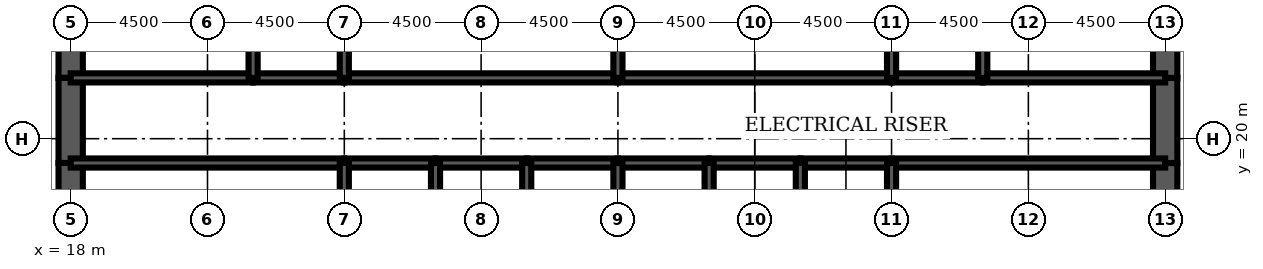
"""IFC4 building model, lengths in metres.
Left out: names, types, materials, properties, quantities, classifications, styles, units other than length and angle.
Written with IfcOpenShell. Run it as: python <this file> out.ifc"""

import sys

from ifc_helpers import new_model, si_unit, direction, frame, frame_2d, origin, place, context, subcontext, project, spatial, rectangle, extrude, element, fill, save


model = new_model("IFC4")
c1 = context("Model", 3, precision=1e-05, world=origin(), true_north=direction((0.0, 1.0)))
c2 = subcontext(c1, "Body", "Model", "MODEL_VIEW")
j1 = project(units=[si_unit("LENGTHUNIT", "METRE"), si_unit("PLANEANGLEUNIT", "RADIAN")], contexts=[c1])
p1 = place(None, origin())
s1 = spatial("IfcSite", under=j1, at=p1, CompositionType="ELEMENT")
p2 = place(p1, origin())
s2 = spatial("IfcBuilding", under=s1, at=p2, CompositionType="ELEMENT")
p3 = place(p2, frame((0.0, 0.0, 190.0)))
s3 = spatial("IfcBuildingStorey", under=s2, at=p3, CompositionType="ELEMENT", Elevation=190.0)
p4 = place(p3, frame((18.0, 26.0, 0.0), z_axis=(0.0, 0.0, 1.0), x_axis=(0.0, -1.0, 0.0)))
e1 = element("IfcWall", 1, at=p4, inside=s3, PredefinedType="SHEAR", context=c2, shape_type="SweptSolid", body=[
    extrude(rectangle(XDim=4.0, YDim=0.8, at=frame_2d((2.0, 0.0))), origin(), (0.0, 0.0, 1.0), 4.2),
])
p5 = place(p3, frame((18.0, 22.0, 0.0), z_axis=(0.0, 0.0, 1.0), x_axis=(0.0, -1.0, 0.0)))
e2 = element("IfcWall", 2, at=p5, inside=s3, PredefinedType="SHEAR", context=c2, shape_type="SweptSolid", body=[
    extrude(rectangle(XDim=2.8, YDim=0.8, at=frame_2d((1.4, 0.0))), origin(), (0.0, 0.0, 1.0), 4.2),
])
p6 = place(p5, frame((0.6, 0.0, 0.0)))
e3 = element("IfcOpeningElement", 3, at=p6, cuts=e2, PredefinedType="OPENING", context=c2, shape_type="SweptSolid", body=[
    extrude(rectangle(XDim=1.8, YDim=2.1, at=frame_2d((0.9, 1.05))), frame((0.0, 0.41, 0.0), z_axis=(0.0, -1.0, 0.0), x_axis=(1.0, 0.0, 0.0)), (0.0, 0.0, 1.0), 0.82),
])
for number, where, z_axis, x_axis in (
    (4, (18.0, 19.2, 0.0), (0.0, 0.0, 1.0), (0.0, -1.0, 0.0)),
    (5, (54.0, 16.0, 0.0), (0.0, 0.0, 1.0), (0.0, 1.0, 0.0)),
):
    element("IfcWall", number, at=place(p3, frame(where, z_axis=z_axis, x_axis=x_axis)), inside=s3, PredefinedType="SHEAR", context=c2, shape_type="SweptSolid", body=[
        extrude(rectangle(XDim=3.2, YDim=0.8, at=frame_2d((1.6, 0.0))), origin(), (0.0, 0.0, 1.0), 4.2),
    ])
p7 = place(p3, frame((54.0, 19.2, 0.0), z_axis=(0.0, 0.0, 1.0), x_axis=(0.0, 1.0, 0.0)))
e6 = element("IfcWall", 6, at=p7, inside=s3, PredefinedType="SHEAR", context=c2, shape_type="SweptSolid", body=[
    extrude(rectangle(XDim=2.8, YDim=0.8, at=frame_2d((1.4, 0.0))), origin(), (0.0, 0.0, 1.0), 4.2),
])
p8 = place(p7, frame((0.4, 0.0, 0.0)))
e7 = element("IfcOpeningElement", 7, at=p8, cuts=e6, PredefinedType="OPENING", context=c2, shape_type="SweptSolid", body=[
    extrude(rectangle(XDim=1.8, YDim=2.1, at=frame_2d((0.9, 1.05))), frame((0.0, 0.41, 0.0), z_axis=(0.0, -1.0, 0.0), x_axis=(1.0, 0.0, 0.0)), (0.0, 0.0, 1.0), 0.82),
])
p9 = place(p3, frame((54.0, 22.0, 0.0), z_axis=(0.0, 0.0, 1.0), x_axis=(0.0, 1.0, 0.0)))
e8 = element("IfcWall", 8, at=p9, inside=s3, PredefinedType="SHEAR", context=c2, shape_type="SweptSolid", body=[
    extrude(rectangle(XDim=4.0, YDim=0.8, at=frame_2d((2.0, 0.0))), origin(), (0.0, 0.0, 1.0), 4.2),
])
p10 = place(p3, frame((18.0, 19.2, 0.0), z_axis=(0.0, 0.0, 1.0), x_axis=(1.0, 0.0, 0.0)))
e9 = element("IfcWall", 9, at=p10, inside=s3, PredefinedType="SOLIDWALL", context=c2, shape_type="SweptSolid", body=[
    extrude(rectangle(XDim=9.0, YDim=0.3, at=frame_2d((4.5, 0.0))), origin(), (0.0, 0.0, 1.0), 4.2),
])
p11 = place(p10, frame((0.65, 0.0, 0.0)))
e10 = element("IfcOpeningElement", 10, at=p11, cuts=e9, PredefinedType="OPENING", context=c2, shape_type="SweptSolid", body=[
    extrude(rectangle(XDim=1.0, YDim=2.1, at=frame_2d((0.5, 1.05))), frame((0.0, 0.16, 0.0), z_axis=(0.0, -1.0, 0.0), x_axis=(1.0, 0.0, 0.0)), (0.0, 0.0, 1.0), 0.32),
])
p12 = place(p3, frame((27.0, 19.2, 0.0), z_axis=(0.0, 0.0, 1.0), x_axis=(1.0, 0.0, 0.0)))
e11 = element("IfcWall", 11, at=p12, inside=s3, PredefinedType="SOLIDWALL", context=c2, shape_type="SweptSolid", body=[
    extrude(rectangle(XDim=3.0, YDim=0.3, at=frame_2d((1.5, 0.0))), origin(), (0.0, 0.0, 1.0), 4.2),
])
p13 = place(p12, frame((0.95, 0.0, 0.0)))
e12 = element("IfcOpeningElement", 12, at=p13, cuts=e11, PredefinedType="OPENING", context=c2, shape_type="SweptSolid", body=[
    extrude(rectangle(XDim=1.1, YDim=2.2, at=frame_2d((0.55, 1.1))), frame((0.0, 0.16, 0.0), z_axis=(0.0, -1.0, 0.0), x_axis=(1.0, 0.0, 0.0)), (0.0, 0.0, 1.0), 0.32),
])
p14 = place(p3, frame((30.0, 19.2, 0.0), z_axis=(0.0, 0.0, 1.0), x_axis=(1.0, 0.0, 0.0)))
e13 = element("IfcWall", 13, at=p14, inside=s3, PredefinedType="SOLIDWALL", context=c2, shape_type="SweptSolid", body=[
    extrude(rectangle(XDim=3.0, YDim=0.3, at=frame_2d((1.5, 0.0))), origin(), (0.0, 0.0, 1.0), 4.2),
])
p15 = place(p14, frame((0.95, 0.0, 0.0)))
e14 = element("IfcOpeningElement", 14, at=p15, cuts=e13, PredefinedType="OPENING", context=c2, shape_type="SweptSolid", body=[
    extrude(rectangle(XDim=1.1, YDim=2.2, at=frame_2d((0.55, 1.1))), frame((0.0, 0.16, 0.0), z_axis=(0.0, -1.0, 0.0), x_axis=(1.0, 0.0, 0.0)), (0.0, 0.0, 1.0), 0.32),
])
p16 = place(p3, frame((33.0, 19.2, 0.0), z_axis=(0.0, 0.0, 1.0), x_axis=(1.0, 0.0, 0.0)))
e15 = element("IfcWall", 15, at=p16, inside=s3, PredefinedType="SOLIDWALL", context=c2, shape_type="SweptSolid", body=[
    extrude(rectangle(XDim=3.0, YDim=0.3, at=frame_2d((1.5, 0.0))), origin(), (0.0, 0.0, 1.0), 4.2),
])
p17 = place(p16, frame((0.95, 0.0, 0.0)))
e16 = element("IfcOpeningElement", 16, at=p17, cuts=e15, PredefinedType="OPENING", context=c2, shape_type="SweptSolid", body=[
    extrude(rectangle(XDim=1.1, YDim=2.2, at=frame_2d((0.55, 1.1))), frame((0.0, 0.16, 0.0), z_axis=(0.0, -1.0, 0.0), x_axis=(1.0, 0.0, 0.0)), (0.0, 0.0, 1.0), 0.32),
])
p18 = place(p3, frame((36.0, 19.2, 0.0), z_axis=(0.0, 0.0, 1.0), x_axis=(1.0, 0.0, 0.0)))
e17 = element("IfcWall", 17, at=p18, inside=s3, PredefinedType="SOLIDWALL", context=c2, shape_type="SweptSolid", body=[
    extrude(rectangle(XDim=3.0, YDim=0.3, at=frame_2d((1.5, 0.0))), origin(), (0.0, 0.0, 1.0), 4.2),
])
p19 = place(p18, frame((0.95, 0.0, 0.0)))
e18 = element("IfcOpeningElement", 18, at=p19, cuts=e17, PredefinedType="OPENING", context=c2, shape_type="SweptSolid", body=[
    extrude(rectangle(XDim=1.1, YDim=2.2, at=frame_2d((0.55, 1.1))), frame((0.0, 0.16, 0.0), z_axis=(0.0, -1.0, 0.0), x_axis=(1.0, 0.0, 0.0)), (0.0, 0.0, 1.0), 0.32),
])
p20 = place(p3, frame((39.0, 19.2, 0.0), z_axis=(0.0, 0.0, 1.0), x_axis=(1.0, 0.0, 0.0)))
e19 = element("IfcWall", 19, at=p20, inside=s3, PredefinedType="SOLIDWALL", context=c2, shape_type="SweptSolid", body=[
    extrude(rectangle(XDim=3.0, YDim=0.3, at=frame_2d((1.5, 0.0))), origin(), (0.0, 0.0, 1.0), 4.2),
])
p21 = place(p20, frame((1.0, 0.0, 0.0)))
e20 = element("IfcOpeningElement", 20, at=p21, cuts=e19, PredefinedType="OPENING", context=c2, shape_type="SweptSolid", body=[
    extrude(rectangle(XDim=1.0, YDim=2.1, at=frame_2d((0.5, 1.05))), frame((0.0, 0.16, 0.0), z_axis=(0.0, -1.0, 0.0), x_axis=(1.0, 0.0, 0.0)), (0.0, 0.0, 1.0), 0.32),
])
p22 = place(p3, frame((42.0, 19.2, 0.0), z_axis=(0.0, 0.0, 1.0), x_axis=(1.0, 0.0, 0.0)))
e21 = element("IfcWall", 21, at=p22, inside=s3, PredefinedType="SOLIDWALL", context=c2, shape_type="SweptSolid", body=[
    extrude(rectangle(XDim=3.0, YDim=0.3, at=frame_2d((1.5, 0.0))), origin(), (0.0, 0.0, 1.0), 4.2),
])
p23 = place(p22, frame((1.0, 0.0, 0.0)))
e22 = element("IfcOpeningElement", 22, at=p23, cuts=e21, PredefinedType="OPENING", context=c2, shape_type="SweptSolid", body=[
    extrude(rectangle(XDim=1.0, YDim=2.1, at=frame_2d((0.5, 1.05))), frame((0.0, 0.16, 0.0), z_axis=(0.0, -1.0, 0.0), x_axis=(1.0, 0.0, 0.0)), (0.0, 0.0, 1.0), 0.32),
])
p24 = place(p3, frame((45.0, 19.2, 0.0), z_axis=(0.0, 0.0, 1.0), x_axis=(1.0, 0.0, 0.0)))
e23 = element("IfcWall", 23, at=p24, inside=s3, PredefinedType="SOLIDWALL", context=c2, shape_type="SweptSolid", body=[
    extrude(rectangle(XDim=9.0, YDim=0.3, at=frame_2d((4.5, 0.0))), origin(), (0.0, 0.0, 1.0), 4.2),
])
p25 = place(p24, frame((7.35, 0.0, 0.0)))
e24 = element("IfcOpeningElement", 24, at=p25, cuts=e23, PredefinedType="OPENING", context=c2, shape_type="SweptSolid", body=[
    extrude(rectangle(XDim=1.0, YDim=2.1, at=frame_2d((0.5, 1.05))), frame((0.0, 0.16, 0.0), z_axis=(0.0, -1.0, 0.0), x_axis=(1.0, 0.0, 0.0)), (0.0, 0.0, 1.0), 0.32),
])
p26 = place(p3, frame((18.0, 22.0, 0.0), z_axis=(0.0, 0.0, 1.0), x_axis=(1.0, 0.0, 0.0)))
e25 = element("IfcWall", 25, at=p26, inside=s3, PredefinedType="SOLIDWALL", context=c2, shape_type="SweptSolid", body=[
    extrude(rectangle(XDim=6.0, YDim=0.3, at=frame_2d((3.0, 0.0))), origin(), (0.0, 0.0, 1.0), 4.2),
])
p27 = place(p26, frame((4.4, 0.0, 0.0)))
e26 = element("IfcOpeningElement", 26, at=p27, cuts=e25, PredefinedType="OPENING", context=c2, shape_type="SweptSolid", body=[
    extrude(rectangle(XDim=1.0, YDim=2.1, at=frame_2d((0.5, 1.05))), frame((0.0, 0.16, 0.0), z_axis=(0.0, -1.0, 0.0), x_axis=(1.0, 0.0, 0.0)), (0.0, 0.0, 1.0), 0.32),
])
p28 = place(p26, frame((0.8, 0.0, 0.0)))
e27 = element("IfcOpeningElement", 27, at=p28, cuts=e25, PredefinedType="OPENING", context=c2, shape_type="SweptSolid", body=[
    extrude(rectangle(XDim=1.0, YDim=2.1, at=frame_2d((0.5, 1.05))), frame((0.0, 0.16, 0.0), z_axis=(0.0, -1.0, 0.0), x_axis=(1.0, 0.0, 0.0)), (0.0, 0.0, 1.0), 0.32),
])
p29 = place(p3, frame((24.0, 22.0, 0.0), z_axis=(0.0, 0.0, 1.0), x_axis=(1.0, 0.0, 0.0)))
e28 = element("IfcWall", 28, at=p29, inside=s3, PredefinedType="SOLIDWALL", context=c2, shape_type="SweptSolid", body=[
    extrude(rectangle(XDim=3.0, YDim=0.3, at=frame_2d((1.5, 0.0))), origin(), (0.0, 0.0, 1.0), 4.2),
])
p30 = place(p29, frame((1.0, 0.0, 0.0)))
e29 = element("IfcOpeningElement", 29, at=p30, cuts=e28, PredefinedType="OPENING", context=c2, shape_type="SweptSolid", body=[
    extrude(rectangle(XDim=1.0, YDim=2.1, at=frame_2d((0.5, 1.05))), frame((0.0, 0.16, 0.0), z_axis=(0.0, -1.0, 0.0), x_axis=(1.0, 0.0, 0.0)), (0.0, 0.0, 1.0), 0.32),
])
p31 = place(p3, frame((27.0, 22.0, 0.0), z_axis=(0.0, 0.0, 1.0), x_axis=(1.0, 0.0, 0.0)))
e30 = element("IfcWall", 30, at=p31, inside=s3, PredefinedType="SOLIDWALL", context=c2, shape_type="SweptSolid", body=[
    extrude(rectangle(XDim=9.0, YDim=0.3, at=frame_2d((4.5, 0.0))), origin(), (0.0, 0.0, 1.0), 4.2),
])
p32 = place(p31, frame((4.0, 0.0, 0.0)))
e31 = element("IfcOpeningElement", 31, at=p32, cuts=e30, PredefinedType="OPENING", context=c2, shape_type="SweptSolid", body=[
    extrude(rectangle(XDim=1.0, YDim=2.1, at=frame_2d((0.5, 1.05))), frame((0.0, 0.16, 0.0), z_axis=(0.0, -1.0, 0.0), x_axis=(1.0, 0.0, 0.0)), (0.0, 0.0, 1.0), 0.32),
])
p33 = place(p3, frame((36.0, 22.0, 0.0), z_axis=(0.0, 0.0, 1.0), x_axis=(1.0, 0.0, 0.0)))
e32 = element("IfcWall", 32, at=p33, inside=s3, PredefinedType="SOLIDWALL", context=c2, shape_type="SweptSolid", body=[
    extrude(rectangle(XDim=9.0, YDim=0.3, at=frame_2d((4.5, 0.0))), origin(), (0.0, 0.0, 1.0), 4.2),
])
p34 = place(p33, frame((4.0, 0.0, 0.0)))
e33 = element("IfcOpeningElement", 33, at=p34, cuts=e32, PredefinedType="OPENING", context=c2, shape_type="SweptSolid", body=[
    extrude(rectangle(XDim=1.0, YDim=2.1, at=frame_2d((0.5, 1.05))), frame((0.0, 0.16, 0.0), z_axis=(0.0, -1.0, 0.0), x_axis=(1.0, 0.0, 0.0)), (0.0, 0.0, 1.0), 0.32),
])
p35 = place(p3, frame((45.0, 22.0, 0.0), z_axis=(0.0, 0.0, 1.0), x_axis=(1.0, 0.0, 0.0)))
e34 = element("IfcWall", 34, at=p35, inside=s3, PredefinedType="SOLIDWALL", context=c2, shape_type="SweptSolid", body=[
    extrude(rectangle(XDim=3.0, YDim=0.3, at=frame_2d((1.5, 0.0))), origin(), (0.0, 0.0, 1.0), 4.2),
])
p36 = place(p35, frame((1.0, 0.0, 0.0)))
e35 = element("IfcOpeningElement", 35, at=p36, cuts=e34, PredefinedType="OPENING", context=c2, shape_type="SweptSolid", body=[
    extrude(rectangle(XDim=1.0, YDim=2.1, at=frame_2d((0.5, 1.05))), frame((0.0, 0.16, 0.0), z_axis=(0.0, -1.0, 0.0), x_axis=(1.0, 0.0, 0.0)), (0.0, 0.0, 1.0), 0.32),
])
p37 = place(p3, frame((48.0, 22.0, 0.0), z_axis=(0.0, 0.0, 1.0), x_axis=(1.0, 0.0, 0.0)))
e36 = element("IfcWall", 36, at=p37, inside=s3, PredefinedType="SOLIDWALL", context=c2, shape_type="SweptSolid", body=[
    extrude(rectangle(XDim=6.0, YDim=0.3, at=frame_2d((3.0, 0.0))), origin(), (0.0, 0.0, 1.0), 4.2),
])
p38 = place(p37, frame((2.0, 0.0, 0.0)))
e37 = element("IfcOpeningElement", 37, at=p38, cuts=e36, PredefinedType="OPENING", context=c2, shape_type="SweptSolid", body=[
    extrude(rectangle(XDim=1.0, YDim=2.1, at=frame_2d((0.5, 1.05))), frame((0.0, 0.16, 0.0), z_axis=(0.0, -1.0, 0.0), x_axis=(1.0, 0.0, 0.0)), (0.0, 0.0, 1.0), 0.32),
])
p39 = place(p37, frame((4.2, 0.0, 0.0)))
e38 = element("IfcOpeningElement", 38, at=p39, cuts=e36, PredefinedType="OPENING", context=c2, shape_type="SweptSolid", body=[
    extrude(rectangle(XDim=1.0, YDim=2.1, at=frame_2d((0.5, 1.05))), frame((0.0, 0.16, 0.0), z_axis=(0.0, -1.0, 0.0), x_axis=(1.0, 0.0, 0.0)), (0.0, 0.0, 1.0), 0.32),
])
for number, where, z_axis, x_axis in (
    (39, (27.0, 16.0, 0.0), (0.0, 0.0, 1.0), (0.0, 1.0, 0.0)),
    (40, (30.0, 16.0, 0.0), (0.0, 0.0, 1.0), (0.0, 1.0, 0.0)),
    (41, (33.0, 16.0, 0.0), (0.0, 0.0, 1.0), (0.0, 1.0, 0.0)),
    (42, (36.0, 16.0, 0.0), (0.0, 0.0, 1.0), (0.0, 1.0, 0.0)),
    (43, (39.0, 16.0, 0.0), (0.0, 0.0, 1.0), (0.0, 1.0, 0.0)),
    (44, (42.0, 16.0, 0.0), (0.0, 0.0, 1.0), (0.0, 1.0, 0.0)),
    (45, (45.0, 16.0, 0.0), (0.0, 0.0, 1.0), (0.0, 1.0, 0.0)),
):
    element("IfcWall", number, at=place(p3, frame(where, z_axis=z_axis, x_axis=x_axis)), inside=s3, PredefinedType="SOLIDWALL", context=c2, shape_type="SweptSolid", body=[
        extrude(rectangle(XDim=3.2, YDim=0.3, at=frame_2d((1.6, 0.0))), origin(), (0.0, 0.0, 1.0), 4.2),
    ])
for number, where, z_axis, x_axis in (
    (46, (24.0, 22.0, 0.0), (0.0, 0.0, 1.0), (0.0, 1.0, 0.0)),
    (47, (27.0, 22.0, 0.0), (0.0, 0.0, 1.0), (0.0, 1.0, 0.0)),
    (48, (36.0, 22.0, 0.0), (0.0, 0.0, 1.0), (0.0, 1.0, 0.0)),
    (49, (45.0, 22.0, 0.0), (0.0, 0.0, 1.0), (0.0, 1.0, 0.0)),
    (50, (48.0, 22.0, 0.0), (0.0, 0.0, 1.0), (0.0, 1.0, 0.0)),
):
    element("IfcWall", number, at=place(p3, frame(where, z_axis=z_axis, x_axis=x_axis)), inside=s3, PredefinedType="SOLIDWALL", context=c2, shape_type="SweptSolid", body=[
        extrude(rectangle(XDim=4.0, YDim=0.3, at=frame_2d((2.0, 0.0))), origin(), (0.0, 0.0, 1.0), 4.2),
    ])
p40 = place(p3, frame((39.0, 22.15, 0.0), z_axis=(0.0, 0.0, 1.0), x_axis=(0.0, 1.0, 0.0)))
e51 = element("IfcWall", 51, at=p40, inside=s3, PredefinedType="PARTITIONING", context=c2, shape_type="SweptSolid", body=[
    extrude(rectangle(XDim=3.7, YDim=0.15, at=frame_2d((1.85, 0.0))), origin(), (0.0, 0.0, 1.0), 3.0),
])
p41 = place(p40, frame((2.2, 0.0, 0.0)))
e52 = element("IfcOpeningElement", 52, at=p41, cuts=e51, PredefinedType="OPENING", context=c2, shape_type="SweptSolid", body=[
    extrude(rectangle(XDim=1.0, YDim=2.1, at=frame_2d((0.5, 1.05))), frame((0.0, 0.085, 0.0), z_axis=(0.0, -1.0, 0.0), x_axis=(1.0, 0.0, 0.0)), (0.0, 0.0, 1.0), 0.17),
])
for number, where, z_axis, x_axis in (
    (53, (20.275, 22.15, 0.0), (0.0, 0.0, 1.0), (0.0, 1.0, 0.0)),
    (54, (51.725, 22.15, 0.0), (0.0, 0.0, 1.0), (0.0, 1.0, 0.0)),
):
    element("IfcWall", number, at=place(p3, frame(where, z_axis=z_axis, x_axis=x_axis)), inside=s3, PredefinedType="PARTITIONING", context=c2, shape_type="SweptSolid", body=[
        extrude(rectangle(XDim=3.7, YDim=0.15, at=frame_2d((1.85, 0.0))), origin(), (0.0, 0.0, 1.0), 3.0),
    ])
p42 = place(p13, origin())
e55 = element("IfcDoor", 55, at=p42, inside=s3, OperationType="DOUBLE_DOOR_SLIDING", PredefinedType="USERDEFINED", context=c2, shape_type="SweptSolid", body=[
    extrude(rectangle(XDim=1.1, YDim=2.2, at=frame_2d((0.55, 1.1))), frame((0.0, 0.025, 0.0), z_axis=(0.0, -1.0, 0.0), x_axis=(1.0, 0.0, 0.0)), (0.0, 0.0, 1.0), 0.05),
])
fill(e12, e55)
p43 = place(p15, origin())
e56 = element("IfcDoor", 56, at=p43, inside=s3, OperationType="DOUBLE_DOOR_SLIDING", PredefinedType="USERDEFINED", context=c2, shape_type="SweptSolid", body=[
    extrude(rectangle(XDim=1.1, YDim=2.2, at=frame_2d((0.55, 1.1))), frame((0.0, 0.025, 0.0), z_axis=(0.0, -1.0, 0.0), x_axis=(1.0, 0.0, 0.0)), (0.0, 0.0, 1.0), 0.05),
])
fill(e14, e56)
p44 = place(p17, origin())
e57 = element("IfcDoor", 57, at=p44, inside=s3, OperationType="DOUBLE_DOOR_SLIDING", PredefinedType="USERDEFINED", context=c2, shape_type="SweptSolid", body=[
    extrude(rectangle(XDim=1.1, YDim=2.2, at=frame_2d((0.55, 1.1))), frame((0.0, 0.025, 0.0), z_axis=(0.0, -1.0, 0.0), x_axis=(1.0, 0.0, 0.0)), (0.0, 0.0, 1.0), 0.05),
])
fill(e16, e57)
p45 = place(p19, origin())
e58 = element("IfcDoor", 58, at=p45, inside=s3, OperationType="DOUBLE_DOOR_SLIDING", PredefinedType="USERDEFINED", context=c2, shape_type="SweptSolid", body=[
    extrude(rectangle(XDim=1.1, YDim=2.2, at=frame_2d((0.55, 1.1))), frame((0.0, 0.025, 0.0), z_axis=(0.0, -1.0, 0.0), x_axis=(1.0, 0.0, 0.0)), (0.0, 0.0, 1.0), 0.05),
])
fill(e18, e58)
p46 = place(p11, origin())
e59 = element("IfcDoor", 59, at=p46, inside=s3, OperationType="SINGLE_SWING_LEFT", PredefinedType="DOOR", context=c2, shape_type="SweptSolid", body=[
    extrude(rectangle(XDim=1.0, YDim=2.1, at=frame_2d((0.5, 1.05))), frame((0.0, 0.025, 0.0), z_axis=(0.0, -1.0, 0.0), x_axis=(1.0, 0.0, 0.0)), (0.0, 0.0, 1.0), 0.05),
])
fill(e10, e59)
p47 = place(p25, origin())
e60 = element("IfcDoor", 60, at=p47, inside=s3, OperationType="SINGLE_SWING_RIGHT", PredefinedType="DOOR", context=c2, shape_type="SweptSolid", body=[
    extrude(rectangle(XDim=1.0, YDim=2.1, at=frame_2d((0.5, 1.05))), frame((0.0, 0.025, 0.0), z_axis=(0.0, -1.0, 0.0), x_axis=(1.0, 0.0, 0.0)), (0.0, 0.0, 1.0), 0.05),
])
fill(e24, e60)
p48 = place(p6, origin())
e61 = element("IfcDoor", 61, at=p48, inside=s3, OperationType="SINGLE_SWING_LEFT", PredefinedType="DOOR", context=c2, shape_type="SweptSolid", body=[
    extrude(rectangle(XDim=1.8, YDim=2.1, at=frame_2d((0.9, 1.05))), frame((0.0, 0.4, 0.0), z_axis=(0.0, -1.0, 0.0), x_axis=(1.0, 0.0, 0.0)), (0.0, 0.0, 1.0), 0.8),
])
fill(e3, e61)
p49 = place(p8, origin())
e62 = element("IfcDoor", 62, at=p49, inside=s3, OperationType="SINGLE_SWING_LEFT", PredefinedType="DOOR", context=c2, shape_type="SweptSolid", body=[
    extrude(rectangle(XDim=1.8, YDim=2.1, at=frame_2d((0.9, 1.05))), frame((0.0, 0.4, 0.0), z_axis=(0.0, -1.0, 0.0), x_axis=(1.0, 0.0, 0.0)), (0.0, 0.0, 1.0), 0.8),
])
fill(e7, e62)
p50 = place(p27, origin())
e63 = element("IfcDoor", 63, at=p50, inside=s3, OperationType="SINGLE_SWING_RIGHT", PredefinedType="DOOR", context=c2, shape_type="SweptSolid", body=[
    extrude(rectangle(XDim=1.0, YDim=2.1, at=frame_2d((0.5, 1.05))), frame((0.0, 0.025, 0.0), z_axis=(0.0, -1.0, 0.0), x_axis=(1.0, 0.0, 0.0)), (0.0, 0.0, 1.0), 0.05),
])
fill(e26, e63)
p51 = place(p30, origin())
e64 = element("IfcDoor", 64, at=p51, inside=s3, OperationType="SINGLE_SWING_LEFT", PredefinedType="DOOR", context=c2, shape_type="SweptSolid", body=[
    extrude(rectangle(XDim=1.0, YDim=2.1, at=frame_2d((0.5, 1.05))), frame((0.0, 0.025, 0.0), z_axis=(0.0, -1.0, 0.0), x_axis=(1.0, 0.0, 0.0)), (0.0, 0.0, 1.0), 0.05),
])
fill(e29, e64)
p52 = place(p32, origin())
e65 = element("IfcDoor", 65, at=p52, inside=s3, OperationType="SINGLE_SWING_LEFT", PredefinedType="DOOR", context=c2, shape_type="SweptSolid", body=[
    extrude(rectangle(XDim=1.0, YDim=2.1, at=frame_2d((0.5, 1.05))), frame((0.0, 0.025, 0.0), z_axis=(0.0, -1.0, 0.0), x_axis=(1.0, 0.0, 0.0)), (0.0, 0.0, 1.0), 0.05),
])
fill(e31, e65)
p53 = place(p34, origin())
e66 = element("IfcDoor", 66, at=p53, inside=s3, OperationType="SINGLE_SWING_LEFT", PredefinedType="DOOR", context=c2, shape_type="SweptSolid", body=[
    extrude(rectangle(XDim=1.0, YDim=2.1, at=frame_2d((0.5, 1.05))), frame((0.0, 0.025, 0.0), z_axis=(0.0, -1.0, 0.0), x_axis=(1.0, 0.0, 0.0)), (0.0, 0.0, 1.0), 0.05),
])
fill(e33, e66)
p54 = place(p36, origin())
e67 = element("IfcDoor", 67, at=p54, inside=s3, OperationType="SINGLE_SWING_LEFT", PredefinedType="DOOR", context=c2, shape_type="SweptSolid", body=[
    extrude(rectangle(XDim=1.0, YDim=2.1, at=frame_2d((0.5, 1.05))), frame((0.0, 0.025, 0.0), z_axis=(0.0, -1.0, 0.0), x_axis=(1.0, 0.0, 0.0)), (0.0, 0.0, 1.0), 0.05),
])
fill(e35, e67)
p55 = place(p38, origin())
e68 = element("IfcDoor", 68, at=p55, inside=s3, OperationType="SINGLE_SWING_LEFT", PredefinedType="DOOR", context=c2, shape_type="SweptSolid", body=[
    extrude(rectangle(XDim=1.0, YDim=2.1, at=frame_2d((0.5, 1.05))), frame((0.0, 0.025, 0.0), z_axis=(0.0, -1.0, 0.0), x_axis=(1.0, 0.0, 0.0)), (0.0, 0.0, 1.0), 0.05),
])
fill(e37, e68)
p56 = place(p28, origin())
e69 = element("IfcDoor", 69, at=p56, inside=s3, OperationType="SINGLE_SWING_LEFT", PredefinedType="DOOR", context=c2, shape_type="SweptSolid", body=[
    extrude(rectangle(XDim=1.0, YDim=2.1, at=frame_2d((0.5, 1.05))), frame((0.0, 0.025, 0.0), z_axis=(0.0, -1.0, 0.0), x_axis=(1.0, 0.0, 0.0)), (0.0, 0.0, 1.0), 0.05),
])
fill(e27, e69)
p57 = place(p39, origin())
e70 = element("IfcDoor", 70, at=p57, inside=s3, OperationType="SINGLE_SWING_RIGHT", PredefinedType="DOOR", context=c2, shape_type="SweptSolid", body=[
    extrude(rectangle(XDim=1.0, YDim=2.1, at=frame_2d((0.5, 1.05))), frame((0.0, 0.025, 0.0), z_axis=(0.0, -1.0, 0.0), x_axis=(1.0, 0.0, 0.0)), (0.0, 0.0, 1.0), 0.05),
])
fill(e38, e70)
p58 = place(p21, origin())
e71 = element("IfcDoor", 71, at=p58, inside=s3, OperationType="SINGLE_SWING_LEFT", PredefinedType="DOOR", context=c2, shape_type="SweptSolid", body=[
    extrude(rectangle(XDim=1.0, YDim=2.1, at=frame_2d((0.5, 1.05))), frame((0.0, 0.025, 0.0), z_axis=(0.0, -1.0, 0.0), x_axis=(1.0, 0.0, 0.0)), (0.0, 0.0, 1.0), 0.05),
])
fill(e20, e71)
p59 = place(p23, origin())
e72 = element("IfcDoor", 72, at=p59, inside=s3, OperationType="SINGLE_SWING_LEFT", PredefinedType="DOOR", context=c2, shape_type="SweptSolid", body=[
    extrude(rectangle(XDim=1.0, YDim=2.1, at=frame_2d((0.5, 1.05))), frame((0.0, 0.025, 0.0), z_axis=(0.0, -1.0, 0.0), x_axis=(1.0, 0.0, 0.0)), (0.0, 0.0, 1.0), 0.05),
])
fill(e22, e72)
save(model, sys.argv[1])
